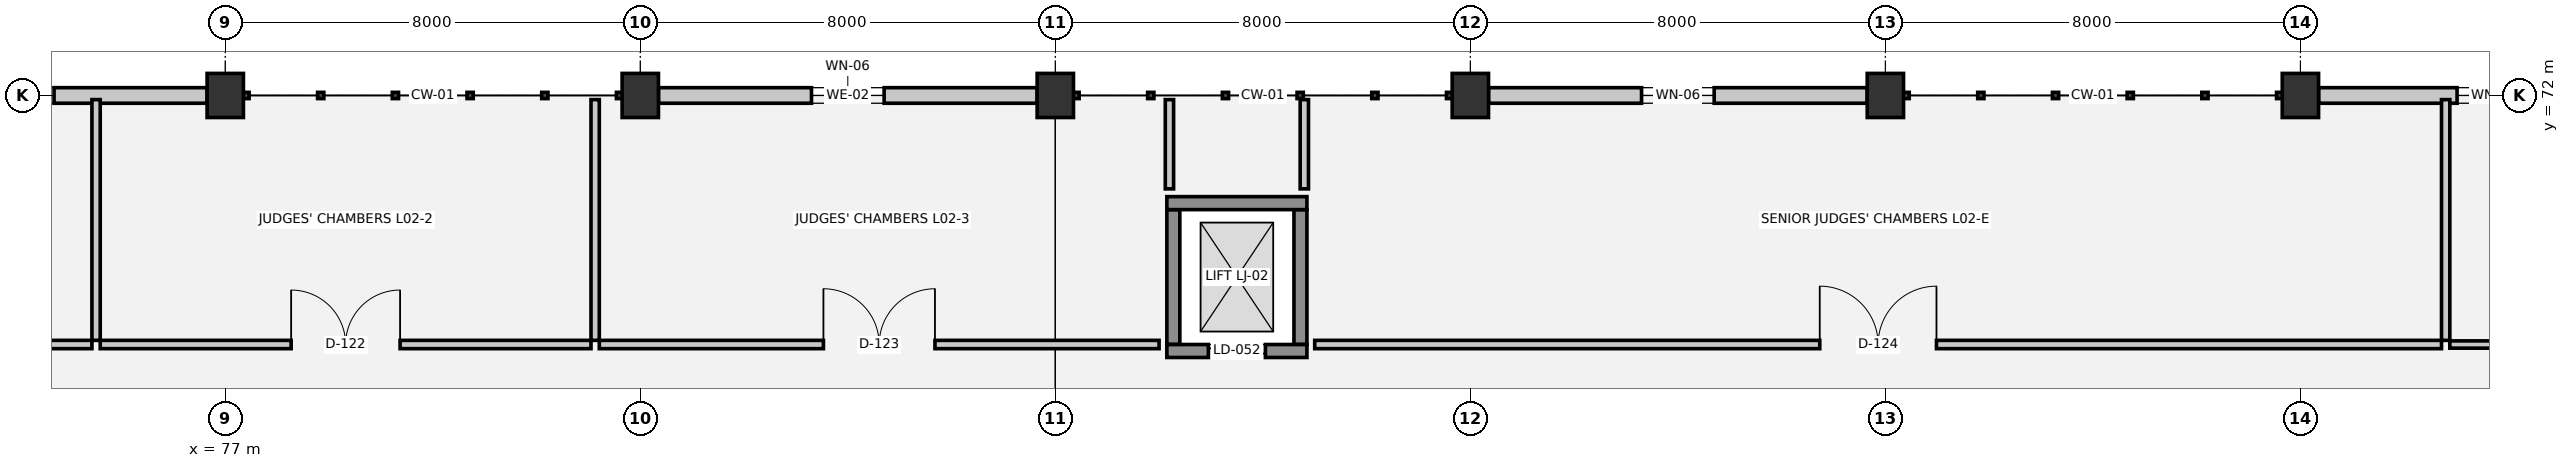
"""IFC4 building model, lengths in metres.
Left out: names, types, materials, properties, quantities, classifications, styles, units other than length and angle.
Written with IfcOpenShell. Run it as: python <this file> out.ifc"""

import sys

from ifc_helpers import new_model, si_unit, direction, frame, frame_2d, origin, origin_2d, place, context, subcontext, project, spatial, rectangle, extrude, element, fill, save


model = new_model("IFC4")
c1 = context("Model", 3, precision=1e-05, world=origin(), true_north=direction((0.0, 1.0)))
c2 = subcontext(c1, "Body", "Model", "MODEL_VIEW")
j1 = project(units=[si_unit("LENGTHUNIT", "METRE"), si_unit("PLANEANGLEUNIT", "RADIAN")], contexts=[c1])
p1 = place(None, origin())
s1 = spatial("IfcSite", under=j1, at=p1, CompositionType="ELEMENT")
p2 = place(p1, origin())
s2 = spatial("IfcBuilding", under=s1, at=p2, CompositionType="ELEMENT")
p3 = place(p2, frame((0.0, 0.0, 5.4)))
s3 = spatial("IfcBuildingStorey", under=s2, at=p3, CompositionType="ELEMENT", Elevation=5.4)
for number, where, z_axis, x_axis in (
    (1, (77.0, 72.0, 0.0), (0.0, 0.0, 1.0), (1.0, 0.0, 0.0)),
    (2, (85.0, 72.0, 0.0), (0.0, 0.0, 1.0), (1.0, 0.0, 0.0)),
    (3, (93.0, 72.0, 0.0), (0.0, 0.0, 1.0), (1.0, 0.0, 0.0)),
    (4, (101.0, 72.0, 0.0), (0.0, 0.0, 1.0), (1.0, 0.0, 0.0)),
    (5, (109.0, 72.0, 0.0), (0.0, 0.0, 1.0), (1.0, 0.0, 0.0)),
    (6, (117.0, 72.0, 0.0), (0.0, 0.0, 1.0), (1.0, 0.0, 0.0)),
):
    element("IfcColumn", number, at=place(p3, frame(where, z_axis=z_axis, x_axis=x_axis)), inside=s3, PredefinedType="COLUMN", context=c2, shape_type="SweptSolid", body=[
        extrude(rectangle(XDim=0.7, YDim=0.85, at=origin_2d()), origin(), (0.0, 0.0, 1.0), 4.5),
    ])
p4 = place(p3, frame((69.35, 72.0, 0.0), z_axis=(0.0, 0.0, 1.0), x_axis=(1.0, 0.0, 0.0)))
e7 = element("IfcWall", 7, at=p4, inside=s3, PredefinedType="SOLIDWALL", context=c2, shape_type="SweptSolid", body=[
    extrude(rectangle(XDim=7.3, YDim=0.3, at=frame_2d((3.65, 0.0))), origin(), (0.0, 0.0, 1.0), 3.23),
])
p5 = place(p4, frame((2.95, 0.0, 1.0)))
e8 = element("IfcOpeningElement", 8, at=p5, cuts=e7, PredefinedType="OPENING", context=c2, shape_type="SweptSolid", body=[
    extrude(rectangle(XDim=1.4, YDim=1.75, at=frame_2d((0.7, 0.875))), frame((0.0, 0.16, 0.0), z_axis=(0.0, -1.0, 0.0), x_axis=(1.0, 0.0, 0.0)), (0.0, 0.0, 1.0), 0.32),
])
p6 = place(p3, frame((85.35, 72.0, 0.0), z_axis=(0.0, 0.0, 1.0), x_axis=(1.0, 0.0, 0.0)))
e9 = element("IfcWall", 9, at=p6, inside=s3, PredefinedType="SOLIDWALL", context=c2, shape_type="SweptSolid", body=[
    extrude(rectangle(XDim=7.3, YDim=0.3, at=frame_2d((3.65, 0.0))), origin(), (0.0, 0.0, 1.0), 3.23),
])
p7 = place(p6, frame((2.95, 0.0, 1.0)))
e10 = element("IfcOpeningElement", 10, at=p7, cuts=e9, PredefinedType="OPENING", context=c2, shape_type="SweptSolid", body=[
    extrude(rectangle(XDim=1.4, YDim=1.75, at=frame_2d((0.7, 0.875))), frame((0.0, 0.16, 0.0), z_axis=(0.0, -1.0, 0.0), x_axis=(1.0, 0.0, 0.0)), (0.0, 0.0, 1.0), 0.32),
])
p8 = place(p3, frame((101.35, 72.0, 0.0), z_axis=(0.0, 0.0, 1.0), x_axis=(1.0, 0.0, 0.0)))
e11 = element("IfcWall", 11, at=p8, inside=s3, PredefinedType="SOLIDWALL", context=c2, shape_type="SweptSolid", body=[
    extrude(rectangle(XDim=7.3, YDim=0.3, at=frame_2d((3.65, 0.0))), origin(), (0.0, 0.0, 1.0), 3.23),
])
p9 = place(p8, frame((2.95, 0.0, 1.0)))
e12 = element("IfcOpeningElement", 12, at=p9, cuts=e11, PredefinedType="OPENING", context=c2, shape_type="SweptSolid", body=[
    extrude(rectangle(XDim=1.4, YDim=1.75, at=frame_2d((0.7, 0.875))), frame((0.0, 0.16, 0.0), z_axis=(0.0, -1.0, 0.0), x_axis=(1.0, 0.0, 0.0)), (0.0, 0.0, 1.0), 0.32),
])
p10 = place(p3, frame((117.35, 72.0, 0.0), z_axis=(0.0, 0.0, 1.0), x_axis=(1.0, 0.0, 0.0)))
e13 = element("IfcWall", 13, at=p10, inside=s3, PredefinedType="SOLIDWALL", context=c2, shape_type="SweptSolid", body=[
    extrude(rectangle(XDim=6.3, YDim=0.3, at=frame_2d((3.15, 0.0))), origin(), (0.0, 0.0, 1.0), 3.23),
])
p11 = place(p10, frame((2.67, 0.0, 1.0)))
e14 = element("IfcOpeningElement", 14, at=p11, cuts=e13, PredefinedType="OPENING", context=c2, shape_type="SweptSolid", body=[
    extrude(rectangle(XDim=1.4, YDim=1.75, at=frame_2d((0.7, 0.875))), frame((0.0, 0.16, 0.0), z_axis=(0.0, -1.0, 0.0), x_axis=(1.0, 0.0, 0.0)), (0.0, 0.0, 1.0), 0.32),
])
p12 = place(p3, frame((95.15, 67.075, 0.0), z_axis=(0.0, 0.0, 1.0), x_axis=(1.0, 0.0, 0.0)))
e15 = element("IfcWall", 15, at=p12, inside=s3, PredefinedType="SHEAR", context=c2, shape_type="SweptSolid", body=[
    extrude(rectangle(XDim=2.7, YDim=0.25, at=frame_2d((1.35, 0.0))), origin(), (0.0, 0.0, 1.0), 4.5),
])
p13 = place(p12, frame((0.8, 0.0, 0.0)))
e16 = element("IfcOpeningElement", 16, at=p13, cuts=e15, PredefinedType="OPENING", context=c2, shape_type="SweptSolid", body=[
    extrude(rectangle(XDim=1.1, YDim=2.15, at=frame_2d((0.55, 1.075))), frame((0.0, 0.135, 0.0), z_axis=(0.0, -1.0, 0.0), x_axis=(1.0, 0.0, 0.0)), (0.0, 0.0, 1.0), 0.27),
])
p14 = place(p3, frame((97.85, 69.925, 0.0), z_axis=(0.0, 0.0, 1.0), x_axis=(-1.0, 0.0, 0.0)))
e17 = element("IfcWall", 17, at=p14, inside=s3, PredefinedType="SHEAR", context=c2, shape_type="SweptSolid", body=[
    extrude(rectangle(XDim=2.7, YDim=0.25, at=frame_2d((1.35, 0.0))), origin(), (0.0, 0.0, 1.0), 4.5),
])
for number, where, z_axis, x_axis in (
    (18, (95.275, 69.795, 0.0), (0.0, 0.0, 1.0), (0.0, -1.0, 0.0)),
    (19, (97.725, 67.205, 0.0), (0.0, 0.0, 1.0), (0.0, 1.0, 0.0)),
):
    element("IfcWall", number, at=place(p3, frame(where, z_axis=z_axis, x_axis=x_axis)), inside=s3, PredefinedType="SHEAR", context=c2, shape_type="SweptSolid", body=[
        extrude(rectangle(XDim=2.59, YDim=0.25, at=frame_2d((1.295, 0.0))), origin(), (0.0, 0.0, 1.0), 4.5),
    ])
p15 = place(p3, frame((62.08, 67.2, 0.0), z_axis=(0.0, 0.0, 1.0), x_axis=(1.0, 0.0, 0.0)))
e20 = element("IfcWall", 20, at=p15, inside=s3, PredefinedType="PARTITIONING", context=c2, shape_type="SweptSolid", body=[
    extrude(rectangle(XDim=12.35, YDim=0.16, at=frame_2d((6.175, 0.0))), origin(), (0.0, 0.0, 1.0), 4.14),
])
p16 = place(p15, frame((5.15, 0.0, 0.0)))
e21 = element("IfcOpeningElement", 21, at=p16, cuts=e20, PredefinedType="OPENING", context=c2, shape_type="SweptSolid", body=[
    extrude(rectangle(XDim=2.05, YDim=2.35, at=frame_2d((1.025, 1.175))), frame((0.0, 0.09, 0.0), z_axis=(0.0, -1.0, 0.0), x_axis=(1.0, 0.0, 0.0)), (0.0, 0.0, 1.0), 0.18),
])
p17 = place(p3, frame((74.59, 67.2, 0.0), z_axis=(0.0, 0.0, 1.0), x_axis=(1.0, 0.0, 0.0)))
e22 = element("IfcWall", 22, at=p17, inside=s3, PredefinedType="PARTITIONING", context=c2, shape_type="SweptSolid", body=[
    extrude(rectangle(XDim=9.46, YDim=0.16, at=frame_2d((4.73, 0.0))), origin(), (0.0, 0.0, 1.0), 4.14),
])
p18 = place(p17, frame((3.68, 0.0, 0.0)))
e23 = element("IfcOpeningElement", 23, at=p18, cuts=e22, PredefinedType="OPENING", context=c2, shape_type="SweptSolid", body=[
    extrude(rectangle(XDim=2.1, YDim=2.35, at=frame_2d((1.05, 1.175))), frame((0.0, 0.09, 0.0), z_axis=(0.0, -1.0, 0.0), x_axis=(1.0, 0.0, 0.0)), (0.0, 0.0, 1.0), 0.18),
])
p19 = place(p3, frame((84.21, 67.2, 0.0), z_axis=(0.0, 0.0, 1.0), x_axis=(1.0, 0.0, 0.0)))
e24 = element("IfcWall", 24, at=p19, inside=s3, PredefinedType="PARTITIONING", context=c2, shape_type="SweptSolid", body=[
    extrude(rectangle(XDim=10.79, YDim=0.16, at=frame_2d((5.395, 0.0))), origin(), (0.0, 0.0, 1.0), 4.14),
])
p20 = place(p19, frame((4.32, 0.0, 0.0)))
e25 = element("IfcOpeningElement", 25, at=p20, cuts=e24, PredefinedType="OPENING", context=c2, shape_type="SweptSolid", body=[
    extrude(rectangle(XDim=2.15, YDim=2.4, at=frame_2d((1.075, 1.2))), frame((0.0, 0.09, 0.0), z_axis=(0.0, -1.0, 0.0), x_axis=(1.0, 0.0, 0.0)), (0.0, 0.0, 1.0), 0.18),
])
p21 = place(p3, frame((98.0, 67.2, 0.0), z_axis=(0.0, 0.0, 1.0), x_axis=(1.0, 0.0, 0.0)))
e26 = element("IfcWall", 26, at=p21, inside=s3, PredefinedType="PARTITIONING", context=c2, shape_type="SweptSolid", body=[
    extrude(rectangle(XDim=21.72, YDim=0.16, at=frame_2d((10.86, 0.0))), origin(), (0.0, 0.0, 1.0), 4.14),
])
p22 = place(p21, frame((9.735, 0.0, 0.0)))
e27 = element("IfcOpeningElement", 27, at=p22, cuts=e26, PredefinedType="OPENING", context=c2, shape_type="SweptSolid", body=[
    extrude(rectangle(XDim=2.25, YDim=2.4, at=frame_2d((1.125, 1.2))), frame((0.0, 0.09, 0.0), z_axis=(0.0, -1.0, 0.0), x_axis=(1.0, 0.0, 0.0)), (0.0, 0.0, 1.0), 0.18),
])
p23 = place(p3, frame((119.88, 67.2, 0.0), z_axis=(0.0, 0.0, 1.0), x_axis=(1.0, 0.0, 0.0)))
e28 = element("IfcWall", 28, at=p23, inside=s3, PredefinedType="PLUMBINGWALL", context=c2, shape_type="SweptSolid", body=[
    extrude(rectangle(XDim=4.04, YDim=0.14, at=frame_2d((2.02, 0.0))), origin(), (0.0, 0.0, 1.0), 4.14),
])
p24 = place(p23, frame((1.56, 0.0, 0.0)))
e29 = element("IfcOpeningElement", 29, at=p24, cuts=e28, PredefinedType="OPENING", context=c2, shape_type="SweptSolid", body=[
    extrude(rectangle(XDim=0.92, YDim=2.1, at=frame_2d((0.46, 1.05))), frame((0.0, 0.08, 0.0), z_axis=(0.0, -1.0, 0.0), x_axis=(1.0, 0.0, 0.0)), (0.0, 0.0, 1.0), 0.16),
])
for number, where, z_axis, x_axis in (
    (30, (74.51, 67.28, 0.0), (0.0, 0.0, 1.0), (0.0, 1.0, 0.0)),
    (31, (84.13, 67.28, 0.0), (0.0, 0.0, 1.0), (0.0, 1.0, 0.0)),
):
    element("IfcWall", number, at=place(p3, frame(where, z_axis=z_axis, x_axis=x_axis)), inside=s3, PredefinedType="PARTITIONING", context=c2, shape_type="SweptSolid", body=[
        extrude(rectangle(XDim=4.64, YDim=0.16, at=frame_2d((2.32, 0.0))), origin(), (0.0, 0.0, 1.0), 4.14),
    ])
for number, where, z_axis, x_axis in (
    (32, (95.2, 70.2, 0.0), (0.0, 0.0, 1.0), (0.0, 1.0, 0.0)),
    (33, (97.8, 70.2, 0.0), (0.0, 0.0, 1.0), (0.0, 1.0, 0.0)),
):
    element("IfcWall", number, at=place(p3, frame(where, z_axis=z_axis, x_axis=x_axis)), inside=s3, PredefinedType="PARTITIONING", context=c2, shape_type="SweptSolid", body=[
        extrude(rectangle(XDim=1.72, YDim=0.16, at=frame_2d((0.86, 0.0))), origin(), (0.0, 0.0, 1.0), 4.14),
    ])
p25 = place(p3, frame((119.8, 67.28, 0.0), z_axis=(0.0, 0.0, 1.0), x_axis=(0.0, 1.0, 0.0)))
e34 = element("IfcWall", 34, at=p25, inside=s3, PredefinedType="PARTITIONING", context=c2, shape_type="SweptSolid", body=[
    extrude(rectangle(XDim=4.64, YDim=0.16, at=frame_2d((2.32, 0.0))), origin(), (0.0, 0.0, 1.0), 4.14),
])
p26 = place(p5, origin())
e35 = element("IfcWindow", 35, at=p26, inside=s3, PartitioningType="SINGLE_PANEL", PredefinedType="WINDOW", context=c2, shape_type="SweptSolid", body=[
    extrude(rectangle(XDim=1.4, YDim=1.75, at=frame_2d((0.7, 0.875))), frame((0.0, 0.03, 0.0), z_axis=(0.0, -1.0, 0.0), x_axis=(1.0, 0.0, 0.0)), (0.0, 0.0, 1.0), 0.06),
])
fill(e8, e35)
p27 = place(p7, origin())
e36 = element("IfcWindow", 36, at=p27, inside=s3, PartitioningType="SINGLE_PANEL", PredefinedType="WINDOW", context=c2, shape_type="SweptSolid", body=[
    extrude(rectangle(XDim=1.4, YDim=1.75, at=frame_2d((0.7, 0.875))), frame((0.0, 0.03, 0.0), z_axis=(0.0, -1.0, 0.0), x_axis=(1.0, 0.0, 0.0)), (0.0, 0.0, 1.0), 0.06),
])
fill(e10, e36)
p28 = place(p9, origin())
e37 = element("IfcWindow", 37, at=p28, inside=s3, PartitioningType="SINGLE_PANEL", PredefinedType="WINDOW", context=c2, shape_type="SweptSolid", body=[
    extrude(rectangle(XDim=1.4, YDim=1.75, at=frame_2d((0.7, 0.875))), frame((0.0, 0.03, 0.0), z_axis=(0.0, -1.0, 0.0), x_axis=(1.0, 0.0, 0.0)), (0.0, 0.0, 1.0), 0.06),
])
fill(e12, e37)
p29 = place(p11, origin())
e38 = element("IfcWindow", 38, at=p29, inside=s3, PartitioningType="SINGLE_PANEL", PredefinedType="WINDOW", context=c2, shape_type="SweptSolid", body=[
    extrude(rectangle(XDim=1.4, YDim=1.75, at=frame_2d((0.7, 0.875))), frame((0.0, 0.03, 0.0), z_axis=(0.0, -1.0, 0.0), x_axis=(1.0, 0.0, 0.0)), (0.0, 0.0, 1.0), 0.06),
])
fill(e14, e38)
p30 = place(p13, origin())
e39 = element("IfcDoor", 39, at=p30, inside=s3, OperationType="DOUBLE_DOOR_SLIDING", PredefinedType="DOOR", context=c2, shape_type="SweptSolid", body=[
    extrude(rectangle(XDim=1.1, YDim=2.15, at=frame_2d((0.55, 1.075))), frame((0.0, 0.025, 0.0), z_axis=(0.0, -1.0, 0.0), x_axis=(1.0, 0.0, 0.0)), (0.0, 0.0, 1.0), 0.05),
])
fill(e16, e39)
p31 = place(p18, origin())
e40 = element("IfcDoor", 40, at=p31, inside=s3, OperationType="DOUBLE_DOOR_SINGLE_SWING", PredefinedType="DOOR", context=c2, shape_type="SweptSolid", body=[
    extrude(rectangle(XDim=2.1, YDim=2.35, at=frame_2d((1.05, 1.175))), frame((0.0, 0.025, 0.0), z_axis=(0.0, -1.0, 0.0), x_axis=(1.0, 0.0, 0.0)), (0.0, 0.0, 1.0), 0.05),
])
fill(e23, e40)
p32 = place(p20, origin())
e41 = element("IfcDoor", 41, at=p32, inside=s3, OperationType="DOUBLE_DOOR_SINGLE_SWING", PredefinedType="DOOR", context=c2, shape_type="SweptSolid", body=[
    extrude(rectangle(XDim=2.15, YDim=2.4, at=frame_2d((1.075, 1.2))), frame((0.0, 0.025, 0.0), z_axis=(0.0, -1.0, 0.0), x_axis=(1.0, 0.0, 0.0)), (0.0, 0.0, 1.0), 0.05),
])
fill(e25, e41)
p33 = place(p22, origin())
e42 = element("IfcDoor", 42, at=p33, inside=s3, OperationType="DOUBLE_DOOR_SINGLE_SWING", PredefinedType="DOOR", context=c2, shape_type="SweptSolid", body=[
    extrude(rectangle(XDim=2.25, YDim=2.4, at=frame_2d((1.125, 1.2))), frame((0.0, 0.025, 0.0), z_axis=(0.0, -1.0, 0.0), x_axis=(1.0, 0.0, 0.0)), (0.0, 0.0, 1.0), 0.05),
])
fill(e27, e42)
save(model, sys.argv[1])
